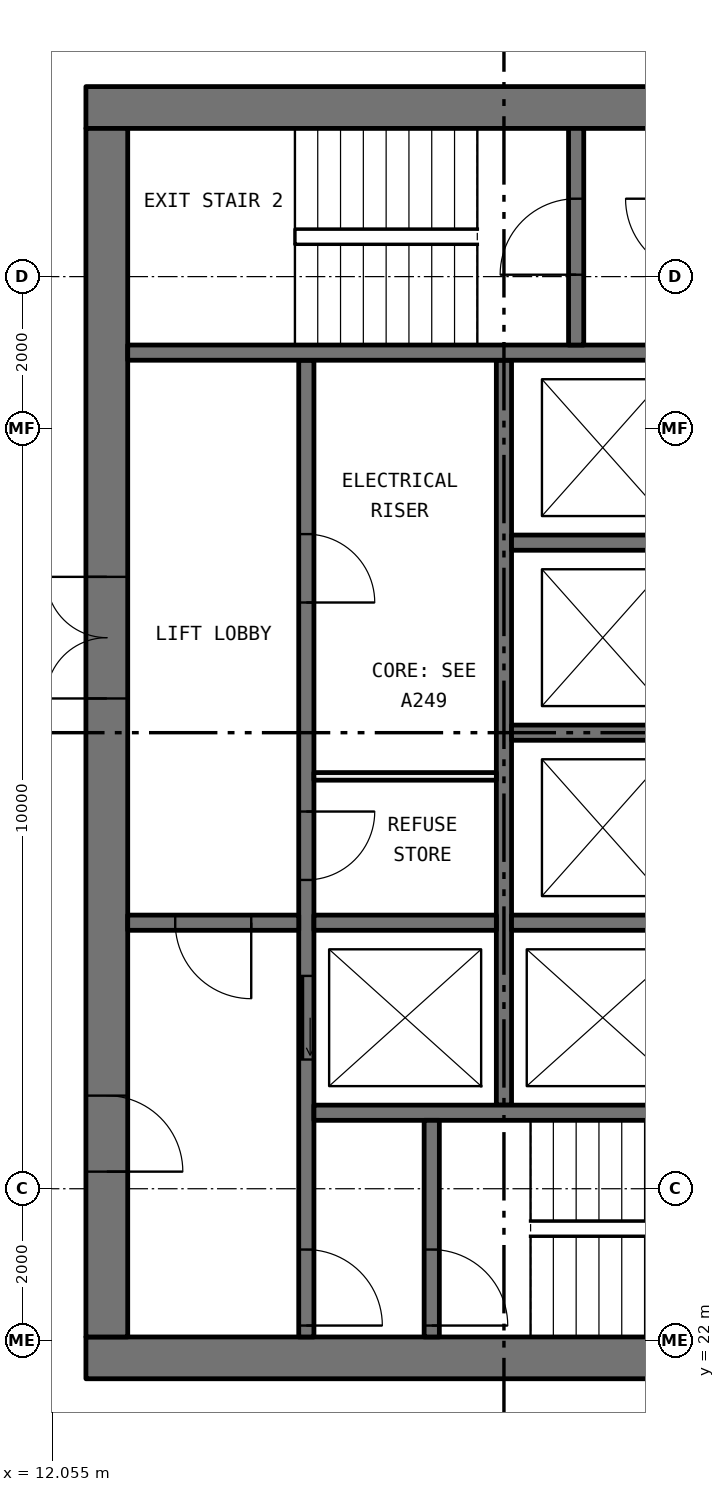
"""IFC4 building model, lengths in metres.
Left out: names, types, materials, properties, quantities, classifications, styles, units other than length and angle.
Written with IfcOpenShell. Run it as: python <this file> out.ifc"""

import sys

from ifc_helpers import new_model, si_unit, direction, frame, frame_2d, origin, place, context, subcontext, project, spatial, rectangle, extrude, element, fill, save


model = new_model("IFC4")
c1 = context("Model", 3, precision=1e-05, world=origin(), true_north=direction((0.0, 1.0)))
c2 = subcontext(c1, "Body", "Model", "MODEL_VIEW")
j1 = project(units=[si_unit("LENGTHUNIT", "METRE"), si_unit("PLANEANGLEUNIT", "RADIAN")], contexts=[c1])
p1 = place(None, origin())
s1 = spatial("IfcSite", under=j1, at=p1, CompositionType="ELEMENT")
p2 = place(p1, origin())
s2 = spatial("IfcBuilding", under=s1, at=p2, CompositionType="ELEMENT")
p3 = place(p2, frame((0.0, 0.0, 182.4)))
s3 = spatial("IfcBuildingStorey", under=s2, at=p3, CompositionType="ELEMENT", Elevation=182.4)
p4 = place(p3, frame((12.5, 21.775, 0.0), z_axis=(0.0, 0.0, 1.0), x_axis=(1.0, 0.0, 0.0)))
e1 = element("IfcWall", 1, at=p4, inside=s3, PredefinedType="SHEAR", context=c2, shape_type="SweptSolid", body=[
    extrude(rectangle(XDim=11.0, YDim=0.55, at=frame_2d((5.5, 0.0))), origin(), (0.0, 0.0, 1.0), 3.05),
])
p5 = place(p3, frame((12.5, 38.225, 0.0), z_axis=(0.0, 0.0, 1.0), x_axis=(1.0, 0.0, 0.0)))
e2 = element("IfcWall", 2, at=p5, inside=s3, PredefinedType="SHEAR", context=c2, shape_type="SweptSolid", body=[
    extrude(rectangle(XDim=11.0, YDim=0.55, at=frame_2d((5.5, 0.0))), origin(), (0.0, 0.0, 1.0), 3.05),
])
p6 = place(p5, frame((8.525, 0.0, 0.0)))
e3 = element("IfcOpeningElement", 3, at=p6, cuts=e2, PredefinedType="OPENING", context=c2, shape_type="SweptSolid", body=[
    extrude(rectangle(XDim=1.6, YDim=2.1, at=frame_2d((0.8, 1.05))), frame((0.0, 0.285, 0.0), z_axis=(0.0, -1.0, 0.0), x_axis=(1.0, 0.0, 0.0)), (0.0, 0.0, 1.0), 0.57),
])
p7 = place(p3, frame((12.775, 22.05, 0.0), z_axis=(0.0, 0.0, 1.0), x_axis=(0.0, 1.0, 0.0)))
e4 = element("IfcWall", 4, at=p7, inside=s3, PredefinedType="SHEAR", context=c2, shape_type="SweptSolid", body=[
    extrude(rectangle(XDim=15.9, YDim=0.55, at=frame_2d((7.95, 0.0))), origin(), (0.0, 0.0, 1.0), 3.05),
])
p8 = place(p7, frame((8.4, 0.0, 0.0)))
e5 = element("IfcOpeningElement", 5, at=p8, cuts=e4, PredefinedType="OPENING", context=c2, shape_type="SweptSolid", body=[
    extrude(rectangle(XDim=1.6, YDim=2.1, at=frame_2d((0.8, 1.05))), frame((0.0, 0.285, 0.0), z_axis=(0.0, -1.0, 0.0), x_axis=(1.0, 0.0, 0.0)), (0.0, 0.0, 1.0), 0.57),
])
p9 = place(p7, frame((2.175, 0.0, 0.0)))
e6 = element("IfcOpeningElement", 6, at=p9, cuts=e4, PredefinedType="OPENING", context=c2, shape_type="SweptSolid", body=[
    extrude(rectangle(XDim=1.0, YDim=2.1, at=frame_2d((0.5, 1.05))), frame((0.0, 0.285, 0.0), z_axis=(0.0, -1.0, 0.0), x_axis=(1.0, 0.0, 0.0)), (0.0, 0.0, 1.0), 0.57),
])
p10 = place(p3, frame((15.4, 22.05, 0.0), z_axis=(0.0, 0.0, 1.0), x_axis=(0.0, 1.0, 0.0)))
e7 = element("IfcWall", 7, at=p10, inside=s3, PredefinedType="SOLIDWALL", context=c2, shape_type="SweptSolid", body=[
    extrude(rectangle(XDim=12.85, YDim=0.2, at=frame_2d((6.425, 0.0))), origin(), (0.0, 0.0, 1.0), 3.05),
])
p11 = place(p10, frame((3.65, 0.0, 0.0)))
e8 = element("IfcOpeningElement", 8, at=p11, cuts=e7, PredefinedType="OPENING", context=c2, shape_type="SweptSolid", body=[
    extrude(rectangle(XDim=1.1, YDim=2.1, at=frame_2d((0.55, 1.05))), frame((0.0, 0.11, 0.0), z_axis=(0.0, -1.0, 0.0), x_axis=(1.0, 0.0, 0.0)), (0.0, 0.0, 1.0), 0.22),
])
p12 = place(p10, frame((0.15, 0.0, 0.0)))
e9 = element("IfcOpeningElement", 9, at=p12, cuts=e7, PredefinedType="OPENING", context=c2, shape_type="SweptSolid", body=[
    extrude(rectangle(XDim=1.0, YDim=2.1, at=frame_2d((0.5, 1.05))), frame((0.0, 0.11, 0.0), z_axis=(0.0, -1.0, 0.0), x_axis=(1.0, 0.0, 0.0)), (0.0, 0.0, 1.0), 0.22),
])
p13 = place(p10, frame((6.012, 0.0, 0.0)))
e10 = element("IfcOpeningElement", 10, at=p13, cuts=e7, PredefinedType="OPENING", context=c2, shape_type="SweptSolid", body=[
    extrude(rectangle(XDim=0.9, YDim=2.1, at=frame_2d((0.45, 1.05))), frame((0.0, 0.11, 0.0), z_axis=(0.0, -1.0, 0.0), x_axis=(1.0, 0.0, 0.0)), (0.0, 0.0, 1.0), 0.22),
])
p14 = place(p10, frame((9.663, 0.0, 0.0)))
e11 = element("IfcOpeningElement", 11, at=p14, cuts=e7, PredefinedType="OPENING", context=c2, shape_type="SweptSolid", body=[
    extrude(rectangle(XDim=0.9, YDim=2.1, at=frame_2d((0.45, 1.05))), frame((0.0, 0.11, 0.0), z_axis=(0.0, -1.0, 0.0), x_axis=(1.0, 0.0, 0.0)), (0.0, 0.0, 1.0), 0.22),
])
p15 = place(p3, frame((18.0, 25.1, 0.0), z_axis=(0.0, 0.0, 1.0), x_axis=(0.0, 1.0, 0.0)))
e12 = element("IfcWall", 12, at=p15, inside=s3, PredefinedType="SOLIDWALL", context=c2, shape_type="SweptSolid", body=[
    extrude(rectangle(XDim=9.8, YDim=0.2, at=frame_2d((4.9, 0.0))), origin(), (0.0, 0.0, 1.0), 3.05),
])
for number, where, z_axis, x_axis in (
    (13, (15.5, 25.0, 0.0), (0.0, 0.0, 1.0), (1.0, 0.0, 0.0)),
    (14, (13.05, 35.0, 0.0), (0.0, 0.0, 1.0), (1.0, 0.0, 0.0)),
):
    element("IfcWall", number, at=place(p3, frame(where, z_axis=z_axis, x_axis=x_axis)), inside=s3, PredefinedType="SOLIDWALL", context=c2, shape_type="SweptSolid", body=[
        extrude(rectangle(XDim=7.45, YDim=0.2, at=frame_2d((3.725, 0.0))), origin(), (0.0, 0.0, 1.0), 3.05),
    ])
p16 = place(p3, frame((13.05, 27.5, 0.0), z_axis=(0.0, 0.0, 1.0), x_axis=(1.0, 0.0, 0.0)))
e15 = element("IfcWall", 15, at=p16, inside=s3, PredefinedType="SOLIDWALL", context=c2, shape_type="SweptSolid", body=[
    extrude(rectangle(XDim=2.25, YDim=0.2, at=frame_2d((1.125, 0.0))), origin(), (0.0, 0.0, 1.0), 3.05),
])
p17 = place(p16, frame((0.625, 0.0, 0.0)))
e16 = element("IfcOpeningElement", 16, at=p17, cuts=e15, PredefinedType="OPENING", context=c2, shape_type="SweptSolid", body=[
    extrude(rectangle(XDim=1.0, YDim=2.1, at=frame_2d((0.5, 1.05))), frame((0.0, 0.11, 0.0), z_axis=(0.0, -1.0, 0.0), x_axis=(1.0, 0.0, 0.0)), (0.0, 0.0, 1.0), 0.22),
])
p18 = place(p3, frame((17.05, 22.05, 0.0), z_axis=(0.0, 0.0, 1.0), x_axis=(0.0, 1.0, 0.0)))
e17 = element("IfcWall", 17, at=p18, inside=s3, PredefinedType="SOLIDWALL", context=c2, shape_type="SweptSolid", body=[
    extrude(rectangle(XDim=2.85, YDim=0.2, at=frame_2d((1.425, 0.0))), origin(), (0.0, 0.0, 1.0), 3.05),
])
p19 = place(p18, frame((0.15, 0.0, 0.0)))
e18 = element("IfcOpeningElement", 18, at=p19, cuts=e17, PredefinedType="OPENING", context=c2, shape_type="SweptSolid", body=[
    extrude(rectangle(XDim=1.0, YDim=2.1, at=frame_2d((0.5, 1.05))), frame((0.0, 0.11, 0.0), z_axis=(0.0, -1.0, 0.0), x_axis=(1.0, 0.0, 0.0)), (0.0, 0.0, 1.0), 0.22),
])
p20 = place(p3, frame((18.95, 35.1, 0.0), z_axis=(0.0, 0.0, 1.0), x_axis=(0.0, 1.0, 0.0)))
e19 = element("IfcWall", 19, at=p20, inside=s3, PredefinedType="SOLIDWALL", context=c2, shape_type="SweptSolid", body=[
    extrude(rectangle(XDim=2.85, YDim=0.2, at=frame_2d((1.425, 0.0))), origin(), (0.0, 0.0, 1.0), 3.05),
])
p21 = place(p20, frame((0.925, 0.0, 0.0)))
e20 = element("IfcOpeningElement", 20, at=p21, cuts=e19, PredefinedType="OPENING", context=c2, shape_type="SweptSolid", body=[
    extrude(rectangle(XDim=1.0, YDim=2.1, at=frame_2d((0.5, 1.05))), frame((0.0, 0.11, 0.0), z_axis=(0.0, -1.0, 0.0), x_axis=(1.0, 0.0, 0.0)), (0.0, 0.0, 1.0), 0.22),
])
for number, where, z_axis, x_axis in (
    (21, (15.5, 27.5, 0.0), (0.0, 0.0, 1.0), (1.0, 0.0, 0.0)),
    (22, (18.1, 27.5, 0.0), (0.0, 0.0, 1.0), (1.0, 0.0, 0.0)),
    (23, (18.1, 30.0, 0.0), (0.0, 0.0, 1.0), (1.0, 0.0, 0.0)),
    (24, (18.1, 32.5, 0.0), (0.0, 0.0, 1.0), (1.0, 0.0, 0.0)),
):
    element("IfcWall", number, at=place(p3, frame(where, z_axis=z_axis, x_axis=x_axis)), inside=s3, PredefinedType="SOLIDWALL", context=c2, shape_type="SweptSolid", body=[
        extrude(rectangle(XDim=2.4, YDim=0.2, at=frame_2d((1.2, 0.0))), origin(), (0.0, 0.0, 1.0), 3.05),
    ])
p22 = place(p3, frame((15.5, 29.425, 0.0), z_axis=(0.0, 0.0, 1.0), x_axis=(1.0, 0.0, 0.0)))
e25 = element("IfcWall", 25, at=p22, inside=s3, PredefinedType="PARTITIONING", context=c2, shape_type="SweptSolid", body=[
    extrude(rectangle(XDim=2.4, YDim=0.1, at=frame_2d((1.2, 0.0))), origin(), (0.0, 0.0, 1.0), 3.05),
])
p23 = place(p11, origin())
e26 = element("IfcDoor", 26, at=p23, inside=s3, OperationType="SLIDING_TO_LEFT", PredefinedType="DOOR", context=c2, shape_type="SweptSolid", body=[
    extrude(rectangle(XDim=1.1, YDim=2.1, at=frame_2d((0.55, 1.05))), frame((0.0, 0.025, 0.0), z_axis=(0.0, -1.0, 0.0), x_axis=(1.0, 0.0, 0.0)), (0.0, 0.0, 1.0), 0.05),
])
fill(e8, e26)
p24 = place(p19, frame((1.0, 0.0, 0.0), x_axis=(-1.0, 0.0, 0.0)))
e27 = element("IfcDoor", 27, at=p24, inside=s3, OperationType="SINGLE_SWING_LEFT", PredefinedType="DOOR", context=c2, shape_type="SweptSolid", body=[
    extrude(rectangle(XDim=1.0, YDim=2.1, at=frame_2d((0.5, 1.05))), frame((0.0, 0.025, 0.0), z_axis=(0.0, -1.0, 0.0), x_axis=(1.0, 0.0, 0.0)), (0.0, 0.0, 1.0), 0.05),
])
fill(e18, e27)
p25 = place(p12, frame((1.0, 0.0, 0.0), x_axis=(-1.0, 0.0, 0.0)))
e28 = element("IfcDoor", 28, at=p25, inside=s3, OperationType="SINGLE_SWING_LEFT", PredefinedType="DOOR", context=c2, shape_type="SweptSolid", body=[
    extrude(rectangle(XDim=1.0, YDim=2.1, at=frame_2d((0.5, 1.05))), frame((0.0, 0.025, 0.0), z_axis=(0.0, -1.0, 0.0), x_axis=(1.0, 0.0, 0.0)), (0.0, 0.0, 1.0), 0.05),
])
fill(e9, e28)
p26 = place(p21, origin())
e29 = element("IfcDoor", 29, at=p26, inside=s3, OperationType="SINGLE_SWING_RIGHT", PredefinedType="DOOR", context=c2, shape_type="SweptSolid", body=[
    extrude(rectangle(XDim=1.0, YDim=2.1, at=frame_2d((0.5, 1.05))), frame((0.0, 0.025, 0.0), z_axis=(0.0, -1.0, 0.0), x_axis=(1.0, 0.0, 0.0)), (0.0, 0.0, 1.0), 0.05),
])
fill(e20, e29)
p27 = place(p17, frame((1.0, 0.0, 0.0), x_axis=(-1.0, 0.0, 0.0)))
e30 = element("IfcDoor", 30, at=p27, inside=s3, OperationType="SINGLE_SWING_RIGHT", PredefinedType="DOOR", context=c2, shape_type="SweptSolid", body=[
    extrude(rectangle(XDim=1.0, YDim=2.1, at=frame_2d((0.5, 1.05))), frame((0.0, 0.025, 0.0), z_axis=(0.0, -1.0, 0.0), x_axis=(1.0, 0.0, 0.0)), (0.0, 0.0, 1.0), 0.05),
])
fill(e16, e30)
p28 = place(p8, origin())
e31 = element("IfcDoor", 31, at=p28, inside=s3, OperationType="DOUBLE_DOOR_SINGLE_SWING", PredefinedType="DOOR", context=c2, shape_type="SweptSolid", body=[
    extrude(rectangle(XDim=1.6, YDim=2.1, at=frame_2d((0.8, 1.05))), frame((0.0, 0.025, 0.0), z_axis=(0.0, -1.0, 0.0), x_axis=(1.0, 0.0, 0.0)), (0.0, 0.0, 1.0), 0.05),
])
fill(e5, e31)
p29 = place(p9, frame((1.0, 0.0, 0.0), x_axis=(-1.0, 0.0, 0.0)))
e32 = element("IfcDoor", 32, at=p29, inside=s3, OperationType="SINGLE_SWING_LEFT", PredefinedType="DOOR", context=c2, shape_type="SweptSolid", body=[
    extrude(rectangle(XDim=1.0, YDim=2.1, at=frame_2d((0.5, 1.05))), frame((0.0, 0.025, 0.0), z_axis=(0.0, -1.0, 0.0), x_axis=(1.0, 0.0, 0.0)), (0.0, 0.0, 1.0), 0.05),
])
fill(e6, e32)
p30 = place(p13, frame((0.9, 0.0, 0.0), x_axis=(-1.0, 0.0, 0.0)))
e33 = element("IfcDoor", 33, at=p30, inside=s3, OperationType="SINGLE_SWING_RIGHT", PredefinedType="DOOR", context=c2, shape_type="SweptSolid", body=[
    extrude(rectangle(XDim=0.9, YDim=2.1, at=frame_2d((0.45, 1.05))), frame((0.0, 0.025, 0.0), z_axis=(0.0, -1.0, 0.0), x_axis=(1.0, 0.0, 0.0)), (0.0, 0.0, 1.0), 0.05),
])
fill(e10, e33)
p31 = place(p14, frame((0.9, 0.0, 0.0), x_axis=(-1.0, 0.0, 0.0)))
e34 = element("IfcDoor", 34, at=p31, inside=s3, OperationType="SINGLE_SWING_LEFT", PredefinedType="DOOR", context=c2, shape_type="SweptSolid", body=[
    extrude(rectangle(XDim=0.9, YDim=2.1, at=frame_2d((0.45, 1.05))), frame((0.0, 0.025, 0.0), z_axis=(0.0, -1.0, 0.0), x_axis=(1.0, 0.0, 0.0)), (0.0, 0.0, 1.0), 0.05),
])
fill(e11, e34)
save(model, sys.argv[1])
